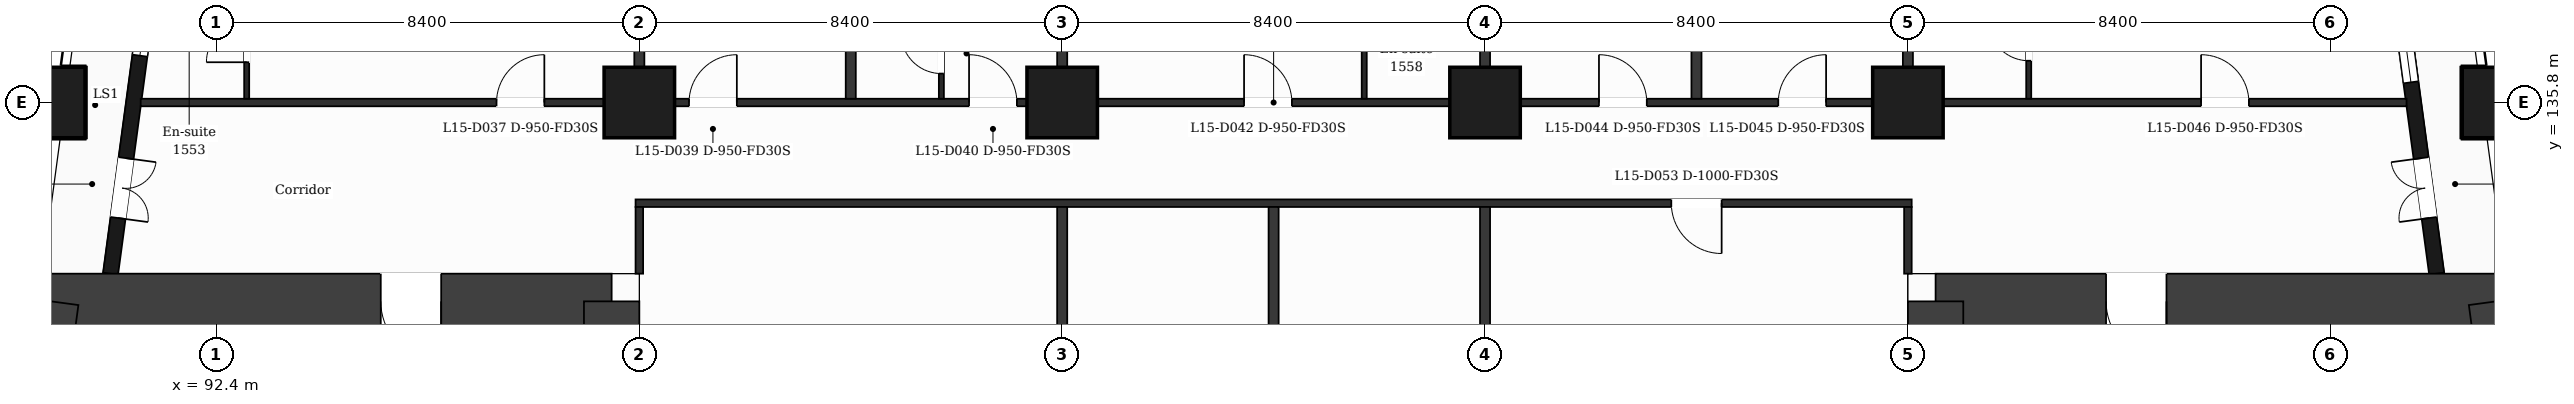
"""IFC4 building model, lengths in metres.
Left out: names, types, materials, properties, quantities, classifications, styles, units other than length and angle.
Written with IfcOpenShell. Run it as: python <this file> out.ifc"""

import sys

from ifc_helpers import new_model, si_unit, direction, frame, frame_2d, origin, origin_2d, place, context, subcontext, project, spatial, rectangle, extrude, element, fill, save


model = new_model("IFC4")
c1 = context("Model", 3, precision=1e-05, world=origin(), true_north=direction((0.0, 1.0)))
c2 = subcontext(c1, "Body", "Model", "MODEL_VIEW")
j1 = project(units=[si_unit("LENGTHUNIT", "METRE"), si_unit("PLANEANGLEUNIT", "RADIAN")], contexts=[c1])
p1 = place(None, origin())
s1 = spatial("IfcSite", under=j1, at=p1, CompositionType="ELEMENT")
p2 = place(p1, origin())
s2 = spatial("IfcBuilding", under=s1, at=p2, CompositionType="ELEMENT")
p3 = place(p2, frame((0.0, 0.0, 70.5)))
s3 = spatial("IfcBuildingStorey", under=s2, at=p3, CompositionType="ELEMENT", Elevation=70.5)
p4 = place(p3, frame((89.112, 131.85, 0.0), z_axis=(0.0, 0.0, 1.0), x_axis=(1.0, 0.0, 0.0)))
e1 = element("IfcWall", 1, at=p4, inside=s3, PredefinedType="SHEAR", context=c2, shape_type="SweptSolid", body=[
    extrude(rectangle(XDim=11.138, YDim=1.1, at=frame_2d((5.569, 0.0))), origin(), (0.0, 0.0, 1.0), 3.5),
])
p5 = place(p4, frame((6.552, 0.0, 0.0)))
e2 = element("IfcOpeningElement", 2, at=p5, cuts=e1, PredefinedType="OPENING", context=c2, shape_type="SweptSolid", body=[
    extrude(rectangle(XDim=1.2, YDim=2.1, at=frame_2d((0.6, 1.05))), frame((0.0, 0.56, 0.0), z_axis=(0.0, -1.0, 0.0), x_axis=(1.0, 0.0, 0.0)), (0.0, 0.0, 1.0), 1.12),
])
p6 = place(p3, frame((100.25, 131.85, 0.0), z_axis=(0.0, 0.0, 1.0), x_axis=(0.0, -1.0, 0.0)))
e3 = element("IfcWall", 3, at=p6, inside=s3, PredefinedType="SHEAR", context=c2, shape_type="SweptSolid", body=[
    extrude(rectangle(XDim=20.9, YDim=1.1, at=frame_2d((10.45, 0.0))), origin(), (0.0, 0.0, 1.0), 3.5),
])
p7 = place(p3, frame((86.298, 110.95, 0.0), z_axis=(0.0, 0.0, 1.0), x_axis=(0.133400422634, 0.99106222168, 0.0)))
e4 = element("IfcWall", 4, at=p7, inside=s3, PredefinedType="SHEAR", context=c2, shape_type="SweptSolid", body=[
    extrude(rectangle(XDim=21.089, YDim=1.1, at=frame_2d((10.544, 0.0))), origin(), (0.0, 0.0, 1.0), 3.5),
])
p8 = place(p3, frame((126.55, 131.85, 0.0), z_axis=(0.0, 0.0, 1.0), x_axis=(1.0, 0.0, 0.0)))
e5 = element("IfcWall", 5, at=p8, inside=s3, PredefinedType="SHEAR", context=c2, shape_type="SweptSolid", body=[
    extrude(rectangle(XDim=11.138, YDim=1.1, at=frame_2d((5.569, 0.0))), origin(), (0.0, 0.0, 1.0), 3.5),
])
p9 = place(p8, frame((3.386, 0.0, 0.0)))
e6 = element("IfcOpeningElement", 6, at=p9, cuts=e5, PredefinedType="OPENING", context=c2, shape_type="SweptSolid", body=[
    extrude(rectangle(XDim=1.2, YDim=2.1, at=frame_2d((0.6, 1.05))), frame((0.0, 0.56, 0.0), z_axis=(0.0, -1.0, 0.0), x_axis=(1.0, 0.0, 0.0)), (0.0, 0.0, 1.0), 1.12),
])
p10 = place(p3, frame((137.688, 131.85, 0.0), z_axis=(0.0, 0.0, 1.0), x_axis=(0.133411793472, -0.991060691059, 0.0)))
e7 = element("IfcWall", 7, at=p10, inside=s3, PredefinedType="SHEAR", context=c2, shape_type="SweptSolid", body=[
    extrude(rectangle(XDim=21.089, YDim=1.1, at=frame_2d((10.544, 0.0))), origin(), (0.0, 0.0, 1.0), 3.5),
])
p11 = place(p3, frame((126.55, 110.95, 0.0), z_axis=(0.0, 0.0, 1.0), x_axis=(0.0, 1.0, 0.0)))
e8 = element("IfcWall", 8, at=p11, inside=s3, PredefinedType="SHEAR", context=c2, shape_type="SweptSolid", body=[
    extrude(rectangle(XDim=20.9, YDim=1.1, at=frame_2d((10.45, 0.0))), origin(), (0.0, 0.0, 1.0), 3.5),
])
for number, where, z_axis, x_axis in (
    (9, (100.8, 135.8, 0.0), (0.0, 0.0, 1.0), (1.0, 0.0, 0.0)),
    (10, (109.2, 135.8, 0.0), (0.0, 0.0, 1.0), (1.0, 0.0, 0.0)),
    (11, (117.6, 135.8, 0.0), (0.0, 0.0, 1.0), (1.0, 0.0, 0.0)),
    (12, (126.0, 135.8, 0.0), (0.0, 0.0, 1.0), (1.0, 0.0, 0.0)),
    (13, (89.088, 135.8, 0.0), (0.0, 0.0, 1.0), (1.0, 0.0, 0.0)),
    (14, (137.711, 135.8, 0.0), (0.0, 0.0, 1.0), (1.0, 0.0, 0.0)),
):
    element("IfcColumn", number, at=place(p3, frame(where, z_axis=z_axis, x_axis=x_axis)), inside=s3, PredefinedType="COLUMN", context=c2, shape_type="SweptSolid", body=[
        extrude(rectangle(XDim=1.4, YDim=1.4, at=origin_2d()), origin(), (0.0, 0.0, 1.0), 3.5),
    ])
p12 = place(p3, frame((136.504, 132.4, 0.0), z_axis=(0.0, 0.0, 1.0), x_axis=(-0.133399697462, 0.99106231929, 0.0)))
e15 = element("IfcWall", 15, at=p12, inside=s3, PredefinedType="SOLIDWALL", context=c2, shape_type="SweptSolid", body=[
    extrude(rectangle(XDim=6.74, YDim=0.3, at=frame_2d((3.37, 0.0))), origin(), (0.0, 0.0, 1.0), 3.18),
])
p13 = place(p12, frame((1.115, 0.0, 0.0)))
e16 = element("IfcOpeningElement", 16, at=p13, cuts=e15, PredefinedType="OPENING", context=c2, shape_type="SweptSolid", body=[
    extrude(rectangle(XDim=1.2, YDim=2.4, at=frame_2d((0.6, 1.2))), frame((0.0, 0.16, 0.0), z_axis=(0.0, -1.0, 0.0), x_axis=(1.0, 0.0, 0.0)), (0.0, 0.0, 1.0), 0.32),
])
p14 = place(p12, frame((3.835, 0.0, 0.9)))
e17 = element("IfcOpeningElement", 17, at=p14, cuts=e15, PredefinedType="OPENING", context=c2, shape_type="SweptSolid", body=[
    extrude(rectangle(XDim=2.4, YDim=2.1, at=frame_2d((1.2, 1.05))), frame((0.0, 0.16, 0.0), z_axis=(0.0, -1.0, 0.0), x_axis=(1.0, 0.0, 0.0)), (0.0, 0.0, 1.0), 0.32),
])
p15 = place(p3, frame((91.177, 138.95, 0.0), z_axis=(0.0, 0.0, 1.0), x_axis=(-0.133426664613, -0.991058689065, 0.0)))
e18 = element("IfcWall", 18, at=p15, inside=s3, PredefinedType="SOLIDWALL", context=c2, shape_type="SweptSolid", body=[
    extrude(rectangle(XDim=6.609, YDim=0.3, at=frame_2d((3.305, 0.0))), origin(), (0.0, 0.0, 1.0), 3.18),
])
p16 = place(p15, frame((1.039, 0.0, 0.9)))
e19 = element("IfcOpeningElement", 19, at=p16, cuts=e18, PredefinedType="OPENING", context=c2, shape_type="SweptSolid", body=[
    extrude(rectangle(XDim=1.2, YDim=2.1, at=frame_2d((0.6, 1.05))), frame((0.0, 0.16, 0.0), z_axis=(0.0, -1.0, 0.0), x_axis=(1.0, 0.0, 0.0)), (0.0, 0.0, 1.0), 0.32),
])
p17 = place(p15, frame((4.294, 0.0, 0.0)))
e20 = element("IfcOpeningElement", 20, at=p17, cuts=e18, PredefinedType="OPENING", context=c2, shape_type="SweptSolid", body=[
    extrude(rectangle(XDim=1.2, YDim=2.4, at=frame_2d((0.6, 1.2))), frame((0.0, 0.16, 0.0), z_axis=(0.0, -1.0, 0.0), x_axis=(1.0, 0.0, 0.0)), (0.0, 0.0, 1.0), 0.32),
])
p18 = place(p3, frame((100.725, 133.8, 0.0), z_axis=(0.0, 0.0, 1.0), x_axis=(1.0, 0.0, 0.0)))
e21 = element("IfcWall", 21, at=p18, inside=s3, PredefinedType="PARTITIONING", context=c2, shape_type="SweptSolid", body=[
    extrude(rectangle(XDim=25.35, YDim=0.15, at=frame_2d((12.675, 0.0))), origin(), (0.0, 0.0, 1.0), 3.18),
])
p19 = place(p18, frame((20.575, 0.0, 0.0)))
e22 = element("IfcOpeningElement", 22, at=p19, cuts=e21, PredefinedType="OPENING", context=c2, shape_type="SweptSolid", body=[
    extrude(rectangle(XDim=1.0, YDim=2.1, at=frame_2d((0.5, 1.05))), frame((0.0, 0.085, 0.0), z_axis=(0.0, -1.0, 0.0), x_axis=(1.0, 0.0, 0.0)), (0.0, 0.0, 1.0), 0.17),
])
p20 = place(p3, frame((90.895, 135.8, 0.0), z_axis=(0.0, 0.0, 1.0), x_axis=(1.0, 0.0, 0.0)))
e23 = element("IfcWall", 23, at=p20, inside=s3, PredefinedType="PARTITIONING", context=c2, shape_type="SweptSolid", body=[
    extrude(rectangle(XDim=45.011, YDim=0.15, at=frame_2d((22.505, 0.0))), origin(), (0.0, 0.0, 1.0), 3.18),
])
p21 = place(p20, frame((7.068, 0.0, 0.0)))
e24 = element("IfcOpeningElement", 24, at=p21, cuts=e23, PredefinedType="OPENING", context=c2, shape_type="SweptSolid", body=[
    extrude(rectangle(XDim=0.95, YDim=2.1, at=frame_2d((0.475, 1.05))), frame((0.0, 0.085, 0.0), z_axis=(0.0, -1.0, 0.0), x_axis=(1.0, 0.0, 0.0)), (0.0, 0.0, 1.0), 0.17),
])
p22 = place(p20, frame((10.892, 0.0, 0.0)))
e25 = element("IfcOpeningElement", 25, at=p22, cuts=e23, PredefinedType="OPENING", context=c2, shape_type="SweptSolid", body=[
    extrude(rectangle(XDim=0.95, YDim=2.1, at=frame_2d((0.475, 1.05))), frame((0.0, 0.085, 0.0), z_axis=(0.0, -1.0, 0.0), x_axis=(1.0, 0.0, 0.0)), (0.0, 0.0, 1.0), 0.17),
])
p23 = place(p20, frame((16.455, 0.0, 0.0)))
e26 = element("IfcOpeningElement", 26, at=p23, cuts=e23, PredefinedType="OPENING", context=c2, shape_type="SweptSolid", body=[
    extrude(rectangle(XDim=0.95, YDim=2.1, at=frame_2d((0.475, 1.05))), frame((0.0, 0.085, 0.0), z_axis=(0.0, -1.0, 0.0), x_axis=(1.0, 0.0, 0.0)), (0.0, 0.0, 1.0), 0.17),
])
p24 = place(p20, frame((21.918, 0.0, 0.0)))
e27 = element("IfcOpeningElement", 27, at=p24, cuts=e23, PredefinedType="OPENING", context=c2, shape_type="SweptSolid", body=[
    extrude(rectangle(XDim=0.95, YDim=2.1, at=frame_2d((0.475, 1.05))), frame((0.0, 0.085, 0.0), z_axis=(0.0, -1.0, 0.0), x_axis=(1.0, 0.0, 0.0)), (0.0, 0.0, 1.0), 0.17),
])
p25 = place(p20, frame((28.969, 0.0, 0.0)))
e28 = element("IfcOpeningElement", 28, at=p25, cuts=e23, PredefinedType="OPENING", context=c2, shape_type="SweptSolid", body=[
    extrude(rectangle(XDim=0.95, YDim=2.1, at=frame_2d((0.475, 1.05))), frame((0.0, 0.085, 0.0), z_axis=(0.0, -1.0, 0.0), x_axis=(1.0, 0.0, 0.0)), (0.0, 0.0, 1.0), 0.17),
])
p26 = place(p20, frame((32.531, 0.0, 0.0)))
e29 = element("IfcOpeningElement", 29, at=p26, cuts=e23, PredefinedType="OPENING", context=c2, shape_type="SweptSolid", body=[
    extrude(rectangle(XDim=0.95, YDim=2.1, at=frame_2d((0.475, 1.05))), frame((0.0, 0.085, 0.0), z_axis=(0.0, -1.0, 0.0), x_axis=(1.0, 0.0, 0.0)), (0.0, 0.0, 1.0), 0.17),
])
p27 = place(p20, frame((40.929, 0.0, 0.0)))
e30 = element("IfcOpeningElement", 30, at=p27, cuts=e23, PredefinedType="OPENING", context=c2, shape_type="SweptSolid", body=[
    extrude(rectangle(XDim=0.95, YDim=2.1, at=frame_2d((0.475, 1.05))), frame((0.0, 0.085, 0.0), z_axis=(0.0, -1.0, 0.0), x_axis=(1.0, 0.0, 0.0)), (0.0, 0.0, 1.0), 0.17),
])
p28 = place(p3, frame((93.0, 135.875, 0.0), z_axis=(0.0, 0.0, 1.0), x_axis=(0.0, 1.0, 0.0)))
e31 = element("IfcWall", 31, at=p28, inside=s3, PredefinedType="PARTITIONING", context=c2, shape_type="SweptSolid", body=[
    extrude(rectangle(XDim=2.275, YDim=0.1, at=frame_2d((1.137, 0.0))), origin(), (0.0, 0.0, 1.0), 3.18),
])
p29 = place(p28, frame((0.725, 0.0, 0.0)))
e32 = element("IfcOpeningElement", 32, at=p29, cuts=e31, PredefinedType="OPENING", context=c2, shape_type="SweptSolid", body=[
    extrude(rectangle(XDim=0.8, YDim=2.1, at=frame_2d((0.4, 1.05))), frame((0.0, 0.06, 0.0), z_axis=(0.0, -1.0, 0.0), x_axis=(1.0, 0.0, 0.0)), (0.0, 0.0, 1.0), 0.12),
])
p30 = place(p3, frame((100.8, 135.875, 0.0), z_axis=(0.0, 0.0, 1.0), x_axis=(0.0, 1.0, 0.0)))
e33 = element("IfcWall", 33, at=p30, inside=s3, PredefinedType="PARTITIONING", context=c2, shape_type="SweptSolid", body=[
    extrude(rectangle(XDim=7.135, YDim=0.2, at=frame_2d((3.567, 0.0))), origin(), (0.0, 0.0, 1.0), 3.18),
])
p31 = place(p3, frame((100.8, 132.4, 0.0), z_axis=(0.0, 0.0, 1.0), x_axis=(0.0, 1.0, 0.0)))
e34 = element("IfcWall", 34, at=p31, inside=s3, PredefinedType="PARTITIONING", context=c2, shape_type="SweptSolid", body=[
    extrude(rectangle(XDim=1.325, YDim=0.15, at=frame_2d((0.663, 0.0))), origin(), (0.0, 0.0, 1.0), 3.18),
])
p32 = place(p3, frame((105.0, 135.875, 0.0), z_axis=(0.0, 0.0, 1.0), x_axis=(0.0, 1.0, 0.0)))
e35 = element("IfcWall", 35, at=p32, inside=s3, PredefinedType="PARTITIONING", context=c2, shape_type="SweptSolid", body=[
    extrude(rectangle(XDim=7.135, YDim=0.2, at=frame_2d((3.567, 0.0))), origin(), (0.0, 0.0, 1.0), 3.18),
])
p33 = place(p3, frame((106.8, 135.875, 0.0), z_axis=(0.0, 0.0, 1.0), x_axis=(0.0, 1.0, 0.0)))
e36 = element("IfcWall", 36, at=p33, inside=s3, PredefinedType="PARTITIONING", context=c2, shape_type="SweptSolid", body=[
    extrude(rectangle(XDim=2.275, YDim=0.1, at=frame_2d((1.137, 0.0))), origin(), (0.0, 0.0, 1.0), 3.18),
])
p34 = place(p33, frame((0.5, 0.0, 0.0)))
e37 = element("IfcOpeningElement", 37, at=p34, cuts=e36, PredefinedType="OPENING", context=c2, shape_type="SweptSolid", body=[
    extrude(rectangle(XDim=0.8, YDim=2.1, at=frame_2d((0.4, 1.05))), frame((0.0, 0.06, 0.0), z_axis=(0.0, -1.0, 0.0), x_axis=(1.0, 0.0, 0.0)), (0.0, 0.0, 1.0), 0.12),
])
p35 = place(p3, frame((109.2, 109.075, 0.0), z_axis=(0.0, 0.0, 1.0), x_axis=(0.0, 1.0, 0.0)))
e38 = element("IfcWall", 38, at=p35, inside=s3, PredefinedType="PARTITIONING", context=c2, shape_type="SweptSolid", body=[
    extrude(rectangle(XDim=24.65, YDim=0.2, at=frame_2d((12.325, 0.0))), origin(), (0.0, 0.0, 1.0), 3.18),
])
p36 = place(p3, frame((109.2, 135.875, 0.0), z_axis=(0.0, 0.0, 1.0), x_axis=(0.0, 1.0, 0.0)))
e39 = element("IfcWall", 39, at=p36, inside=s3, PredefinedType="PARTITIONING", context=c2, shape_type="SweptSolid", body=[
    extrude(rectangle(XDim=7.135, YDim=0.2, at=frame_2d((3.567, 0.0))), origin(), (0.0, 0.0, 1.0), 3.18),
])
p37 = place(p3, frame((113.4, 109.075, 0.0), z_axis=(0.0, 0.0, 1.0), x_axis=(0.0, 1.0, 0.0)))
e40 = element("IfcWall", 40, at=p37, inside=s3, PredefinedType="PARTITIONING", context=c2, shape_type="SweptSolid", body=[
    extrude(rectangle(XDim=24.65, YDim=0.2, at=frame_2d((12.325, 0.0))), origin(), (0.0, 0.0, 1.0), 3.18),
])
p38 = place(p3, frame((115.2, 135.875, 0.0), z_axis=(0.0, 0.0, 1.0), x_axis=(0.0, 1.0, 0.0)))
e41 = element("IfcWall", 41, at=p38, inside=s3, PredefinedType="PARTITIONING", context=c2, shape_type="SweptSolid", body=[
    extrude(rectangle(XDim=2.275, YDim=0.1, at=frame_2d((1.137, 0.0))), origin(), (0.0, 0.0, 1.0), 3.18),
])
p39 = place(p3, frame((117.6, 109.075, 0.0), z_axis=(0.0, 0.0, 1.0), x_axis=(0.0, 1.0, 0.0)))
e42 = element("IfcWall", 42, at=p39, inside=s3, PredefinedType="PARTITIONING", context=c2, shape_type="SweptSolid", body=[
    extrude(rectangle(XDim=24.65, YDim=0.2, at=frame_2d((12.325, 0.0))), origin(), (0.0, 0.0, 1.0), 3.18),
])
for number, where, z_axis, x_axis in (
    (43, (117.6, 135.875, 0.0), (0.0, 0.0, 1.0), (0.0, 1.0, 0.0)),
    (44, (121.8, 135.875, 0.0), (0.0, 0.0, 1.0), (0.0, 1.0, 0.0)),
    (45, (126.0, 135.875, 0.0), (0.0, 0.0, 1.0), (0.0, 1.0, 0.0)),
):
    element("IfcWall", number, at=place(p3, frame(where, z_axis=z_axis, x_axis=x_axis)), inside=s3, PredefinedType="PARTITIONING", context=c2, shape_type="SweptSolid", body=[
        extrude(rectangle(XDim=7.135, YDim=0.2, at=frame_2d((3.567, 0.0))), origin(), (0.0, 0.0, 1.0), 3.18),
    ])
p40 = place(p3, frame((126.0, 132.4, 0.0), z_axis=(0.0, 0.0, 1.0), x_axis=(0.0, 1.0, 0.0)))
e46 = element("IfcWall", 46, at=p40, inside=s3, PredefinedType="PARTITIONING", context=c2, shape_type="SweptSolid", body=[
    extrude(rectangle(XDim=1.325, YDim=0.15, at=frame_2d((0.663, 0.0))), origin(), (0.0, 0.0, 1.0), 3.18),
])
p41 = place(p3, frame((128.4, 135.875, 0.0), z_axis=(0.0, 0.0, 1.0), x_axis=(0.0, 1.0, 0.0)))
e47 = element("IfcWall", 47, at=p41, inside=s3, PredefinedType="PARTITIONING", context=c2, shape_type="SweptSolid", body=[
    extrude(rectangle(XDim=2.575, YDim=0.1, at=frame_2d((1.288, 0.0))), origin(), (0.0, 0.0, 1.0), 3.18),
])
p42 = place(p41, frame((0.755, 0.0, 0.0)))
e48 = element("IfcOpeningElement", 48, at=p42, cuts=e47, PredefinedType="OPENING", context=c2, shape_type="SweptSolid", body=[
    extrude(rectangle(XDim=0.8, YDim=2.1, at=frame_2d((0.4, 1.05))), frame((0.0, 0.06, 0.0), z_axis=(0.0, -1.0, 0.0), x_axis=(1.0, 0.0, 0.0)), (0.0, 0.0, 1.0), 0.12),
])
p43 = place(p13, origin())
e49 = element("IfcDoor", 49, at=p43, inside=s3, OperationType="DOUBLE_DOOR_SINGLE_SWING", PredefinedType="DOOR", context=c2, shape_type="SweptSolid", body=[
    extrude(rectangle(XDim=1.2, YDim=2.4, at=frame_2d((0.6, 1.2))), frame((0.0, 0.025, 0.0), z_axis=(0.0, -1.0, 0.0), x_axis=(1.0, 0.0, 0.0)), (0.0, 0.0, 1.0), 0.05),
])
fill(e16, e49)
p44 = place(p14, origin())
e50 = element("IfcWindow", 50, at=p44, inside=s3, PartitioningType="SINGLE_PANEL", PredefinedType="WINDOW", context=c2, shape_type="SweptSolid", body=[
    extrude(rectangle(XDim=2.4, YDim=2.1, at=frame_2d((1.2, 1.05))), frame((0.0, 0.03, 0.0), z_axis=(0.0, -1.0, 0.0), x_axis=(1.0, 0.0, 0.0)), (0.0, 0.0, 1.0), 0.06),
])
fill(e17, e50)
p45 = place(p16, origin())
e51 = element("IfcWindow", 51, at=p45, inside=s3, PartitioningType="SINGLE_PANEL", PredefinedType="WINDOW", context=c2, shape_type="SweptSolid", body=[
    extrude(rectangle(XDim=1.2, YDim=2.1, at=frame_2d((0.6, 1.05))), frame((0.0, 0.03, 0.0), z_axis=(0.0, -1.0, 0.0), x_axis=(1.0, 0.0, 0.0)), (0.0, 0.0, 1.0), 0.06),
])
fill(e19, e51)
p46 = place(p17, origin())
e52 = element("IfcDoor", 52, at=p46, inside=s3, OperationType="DOUBLE_DOOR_SINGLE_SWING", PredefinedType="DOOR", context=c2, shape_type="SweptSolid", body=[
    extrude(rectangle(XDim=1.2, YDim=2.4, at=frame_2d((0.6, 1.2))), frame((0.0, 0.025, 0.0), z_axis=(0.0, -1.0, 0.0), x_axis=(1.0, 0.0, 0.0)), (0.0, 0.0, 1.0), 0.05),
])
fill(e20, e52)
p47 = place(p21, origin())
e53 = element("IfcDoor", 53, at=p47, inside=s3, OperationType="SINGLE_SWING_RIGHT", PredefinedType="DOOR", context=c2, shape_type="SweptSolid", body=[
    extrude(rectangle(XDim=0.95, YDim=2.1, at=frame_2d((0.475, 1.05))), frame((0.0, 0.025, 0.0), z_axis=(0.0, -1.0, 0.0), x_axis=(1.0, 0.0, 0.0)), (0.0, 0.0, 1.0), 0.05),
])
fill(e24, e53)
p48 = place(p29, origin())
e54 = element("IfcDoor", 54, at=p48, inside=s3, OperationType="SINGLE_SWING_LEFT", PredefinedType="DOOR", context=c2, shape_type="SweptSolid", body=[
    extrude(rectangle(XDim=0.8, YDim=2.1, at=frame_2d((0.4, 1.05))), frame((0.0, 0.025, 0.0), z_axis=(0.0, -1.0, 0.0), x_axis=(1.0, 0.0, 0.0)), (0.0, 0.0, 1.0), 0.05),
])
fill(e32, e54)
p49 = place(p22, origin())
e55 = element("IfcDoor", 55, at=p49, inside=s3, OperationType="SINGLE_SWING_RIGHT", PredefinedType="DOOR", context=c2, shape_type="SweptSolid", body=[
    extrude(rectangle(XDim=0.95, YDim=2.1, at=frame_2d((0.475, 1.05))), frame((0.0, 0.025, 0.0), z_axis=(0.0, -1.0, 0.0), x_axis=(1.0, 0.0, 0.0)), (0.0, 0.0, 1.0), 0.05),
])
fill(e25, e55)
p50 = place(p23, origin())
e56 = element("IfcDoor", 56, at=p50, inside=s3, OperationType="SINGLE_SWING_LEFT", PredefinedType="DOOR", context=c2, shape_type="SweptSolid", body=[
    extrude(rectangle(XDim=0.95, YDim=2.1, at=frame_2d((0.475, 1.05))), frame((0.0, 0.025, 0.0), z_axis=(0.0, -1.0, 0.0), x_axis=(1.0, 0.0, 0.0)), (0.0, 0.0, 1.0), 0.05),
])
fill(e26, e56)
p51 = place(p34, origin())
e57 = element("IfcDoor", 57, at=p51, inside=s3, OperationType="SINGLE_SWING_RIGHT", PredefinedType="DOOR", context=c2, shape_type="SweptSolid", body=[
    extrude(rectangle(XDim=0.8, YDim=2.1, at=frame_2d((0.4, 1.05))), frame((0.0, 0.025, 0.0), z_axis=(0.0, -1.0, 0.0), x_axis=(1.0, 0.0, 0.0)), (0.0, 0.0, 1.0), 0.05),
])
fill(e37, e57)
p52 = place(p24, origin())
e58 = element("IfcDoor", 58, at=p52, inside=s3, OperationType="SINGLE_SWING_LEFT", PredefinedType="DOOR", context=c2, shape_type="SweptSolid", body=[
    extrude(rectangle(XDim=0.95, YDim=2.1, at=frame_2d((0.475, 1.05))), frame((0.0, 0.025, 0.0), z_axis=(0.0, -1.0, 0.0), x_axis=(1.0, 0.0, 0.0)), (0.0, 0.0, 1.0), 0.05),
])
fill(e27, e58)
p53 = place(p25, origin())
e59 = element("IfcDoor", 59, at=p53, inside=s3, OperationType="SINGLE_SWING_LEFT", PredefinedType="DOOR", context=c2, shape_type="SweptSolid", body=[
    extrude(rectangle(XDim=0.95, YDim=2.1, at=frame_2d((0.475, 1.05))), frame((0.0, 0.025, 0.0), z_axis=(0.0, -1.0, 0.0), x_axis=(1.0, 0.0, 0.0)), (0.0, 0.0, 1.0), 0.05),
])
fill(e28, e59)
p54 = place(p26, origin())
e60 = element("IfcDoor", 60, at=p54, inside=s3, OperationType="SINGLE_SWING_RIGHT", PredefinedType="DOOR", context=c2, shape_type="SweptSolid", body=[
    extrude(rectangle(XDim=0.95, YDim=2.1, at=frame_2d((0.475, 1.05))), frame((0.0, 0.025, 0.0), z_axis=(0.0, -1.0, 0.0), x_axis=(1.0, 0.0, 0.0)), (0.0, 0.0, 1.0), 0.05),
])
fill(e29, e60)
p55 = place(p27, origin())
e61 = element("IfcDoor", 61, at=p55, inside=s3, OperationType="SINGLE_SWING_LEFT", PredefinedType="DOOR", context=c2, shape_type="SweptSolid", body=[
    extrude(rectangle(XDim=0.95, YDim=2.1, at=frame_2d((0.475, 1.05))), frame((0.0, 0.025, 0.0), z_axis=(0.0, -1.0, 0.0), x_axis=(1.0, 0.0, 0.0)), (0.0, 0.0, 1.0), 0.05),
])
fill(e30, e61)
p56 = place(p42, origin())
e62 = element("IfcDoor", 62, at=p56, inside=s3, OperationType="SINGLE_SWING_RIGHT", PredefinedType="DOOR", context=c2, shape_type="SweptSolid", body=[
    extrude(rectangle(XDim=0.8, YDim=2.1, at=frame_2d((0.4, 1.05))), frame((0.0, 0.025, 0.0), z_axis=(0.0, -1.0, 0.0), x_axis=(1.0, 0.0, 0.0)), (0.0, 0.0, 1.0), 0.05),
])
fill(e48, e62)
p57 = place(p19, origin())
e63 = element("IfcDoor", 63, at=p57, inside=s3, OperationType="SINGLE_SWING_RIGHT", PredefinedType="DOOR", context=c2, shape_type="SweptSolid", body=[
    extrude(rectangle(XDim=1.0, YDim=2.1, at=frame_2d((0.5, 1.05))), frame((0.0, 0.025, 0.0), z_axis=(0.0, -1.0, 0.0), x_axis=(1.0, 0.0, 0.0)), (0.0, 0.0, 1.0), 0.05),
])
fill(e22, e63)
p58 = place(p5, origin())
e64 = element("IfcDoor", 64, at=p58, inside=s3, OperationType="SINGLE_SWING_RIGHT", PredefinedType="DOOR", context=c2, shape_type="SweptSolid", body=[
    extrude(rectangle(XDim=1.2, YDim=2.1, at=frame_2d((0.6, 1.05))), frame((0.0, 0.025, 0.0), z_axis=(0.0, -1.0, 0.0), x_axis=(1.0, 0.0, 0.0)), (0.0, 0.0, 1.0), 0.05),
])
fill(e2, e64)
p59 = place(p9, origin())
e65 = element("IfcDoor", 65, at=p59, inside=s3, OperationType="SINGLE_SWING_RIGHT", PredefinedType="DOOR", context=c2, shape_type="SweptSolid", body=[
    extrude(rectangle(XDim=1.2, YDim=2.1, at=frame_2d((0.6, 1.05))), frame((0.0, 0.025, 0.0), z_axis=(0.0, -1.0, 0.0), x_axis=(1.0, 0.0, 0.0)), (0.0, 0.0, 1.0), 0.05),
])
fill(e6, e65)
save(model, sys.argv[1])
